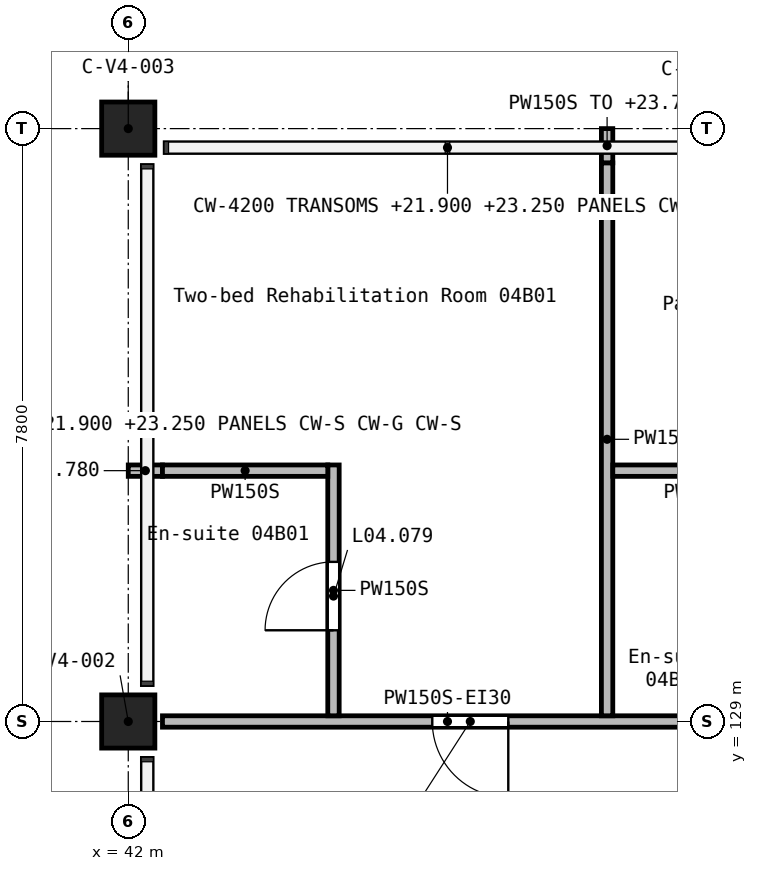
"""IFC4 building model, lengths in metres.
Left out: names, types, materials, properties, quantities, classifications, styles, units other than length and angle.
Written with IfcOpenShell. Run it as: python <this file> out.ifc"""

import sys

from ifc_helpers import new_model, si_unit, direction, frame, frame_2d, origin, origin_2d, place, context, subcontext, project, spatial, rectangle, extrude, element, fill, save


model = new_model("IFC4")
c1 = context("Model", 3, precision=1e-05, world=origin(), true_north=direction((0.0, 1.0)))
c2 = subcontext(c1, "Body", "Model", "MODEL_VIEW")
j1 = project(units=[si_unit("LENGTHUNIT", "METRE"), si_unit("PLANEANGLEUNIT", "RADIAN")], contexts=[c1])
p1 = place(None, origin())
s1 = spatial("IfcSite", under=j1, at=p1, CompositionType="ELEMENT")
p2 = place(p1, origin())
s2 = spatial("IfcBuilding", under=s1, at=p2, CompositionType="ELEMENT")
p3 = place(p2, frame((0.0, 0.0, 21.0)))
s3 = spatial("IfcBuildingStorey", under=s2, at=p3, CompositionType="ELEMENT", Elevation=21.0)
for number, where, z_axis, x_axis in (
    (1, (42.0, 129.0, 0.0), (0.0, 0.0, 1.0), (1.0, 0.0, 0.0)),
    (2, (42.0, 136.8, 0.0), (0.0, 0.0, 1.0), (1.0, 0.0, 0.0)),
):
    element("IfcColumn", number, at=place(p3, frame(where, z_axis=z_axis, x_axis=x_axis)), inside=s3, PredefinedType="COLUMN", context=c2, shape_type="SweptSolid", body=[
        extrude(rectangle(XDim=0.7, YDim=0.7, at=origin_2d()), origin(), (0.0, 0.0, 1.0), 3.9),
    ])
p4 = place(p3, frame((49.95, 129.0, 0.0), z_axis=(0.0, 0.0, 1.0), x_axis=(-1.0, 0.0, 0.0)))
e3 = element("IfcWall", 3, at=p4, inside=s3, PredefinedType="PARTITIONING", context=c2, shape_type="SweptSolid", body=[
    extrude(rectangle(XDim=7.5, YDim=0.15, at=frame_2d((3.75, 0.0))), origin(), (0.0, 0.0, 1.0), 3.6),
])
p5 = place(p4, frame((2.95, 0.0, 0.0)))
e4 = element("IfcOpeningElement", 4, at=p5, cuts=e3, PredefinedType="OPENING", context=c2, shape_type="SweptSolid", body=[
    extrude(rectangle(XDim=1.0, YDim=2.1, at=frame_2d((0.5, 1.05))), frame((0.0, 0.085, 0.0), z_axis=(0.0, -1.0, 0.0), x_axis=(1.0, 0.0, 0.0)), (0.0, 0.0, 1.0), 0.17),
])
p6 = place(p3, frame((48.3, 129.075, 0.0), z_axis=(0.0, 0.0, 1.0), x_axis=(0.0, 1.0, 0.0)))
e5 = element("IfcWall", 5, at=p6, inside=s3, PredefinedType="PARTITIONING", context=c2, shape_type="SweptSolid", body=[
    extrude(rectangle(XDim=7.275, YDim=0.15, at=frame_2d((3.638, 0.0))), origin(), (0.0, 0.0, 1.0), 3.6),
])
p7 = place(p3, frame((48.3, 136.35, 0.0), z_axis=(0.0, 0.0, 1.0), x_axis=(0.0, 1.0, 0.0)))
e6 = element("IfcWall", 6, at=p7, inside=s3, PredefinedType="PARTITIONING", context=c2, shape_type="SweptSolid", body=[
    extrude(rectangle(XDim=0.45, YDim=0.15, at=frame_2d((0.225, 0.0))), origin(), (0.0, 0.0, 1.0), 2.78),
])
p8 = place(p3, frame((44.7, 129.075, 0.0), z_axis=(0.0, 0.0, 1.0), x_axis=(0.0, 1.0, 0.0)))
e7 = element("IfcWall", 7, at=p8, inside=s3, PredefinedType="PARTITIONING", context=c2, shape_type="SweptSolid", body=[
    extrude(rectangle(XDim=3.3, YDim=0.15, at=frame_2d((1.65, 0.0))), origin(), (0.0, 0.0, 1.0), 3.6),
])
p9 = place(p8, frame((1.125, 0.0, 0.0)))
e8 = element("IfcOpeningElement", 8, at=p9, cuts=e7, PredefinedType="OPENING", context=c2, shape_type="SweptSolid", body=[
    extrude(rectangle(XDim=0.9, YDim=2.1, at=frame_2d((0.45, 1.05))), frame((0.0, 0.085, 0.0), z_axis=(0.0, -1.0, 0.0), x_axis=(1.0, 0.0, 0.0)), (0.0, 0.0, 1.0), 0.17),
])
p10 = place(p3, frame((42.0, 132.3, 0.0), z_axis=(0.0, 0.0, 1.0), x_axis=(1.0, 0.0, 0.0)))
e9 = element("IfcWall", 9, at=p10, inside=s3, PredefinedType="PARTITIONING", context=c2, shape_type="SweptSolid", body=[
    extrude(rectangle(XDim=0.45, YDim=0.15, at=frame_2d((0.225, 0.0))), origin(), (0.0, 0.0, 1.0), 2.78),
])
p11 = place(p3, frame((42.45, 132.3, 0.0), z_axis=(0.0, 0.0, 1.0), x_axis=(1.0, 0.0, 0.0)))
e10 = element("IfcWall", 10, at=p11, inside=s3, PredefinedType="PARTITIONING", context=c2, shape_type="SweptSolid", body=[
    extrude(rectangle(XDim=2.175, YDim=0.15, at=frame_2d((1.087, 0.0))), origin(), (0.0, 0.0, 1.0), 3.6),
])
p12 = place(p3, frame((48.375, 132.3, 0.0), z_axis=(0.0, 0.0, 1.0), x_axis=(1.0, 0.0, 0.0)))
e11 = element("IfcWall", 11, at=p12, inside=s3, PredefinedType="PARTITIONING", context=c2, shape_type="SweptSolid", body=[
    extrude(rectangle(XDim=2.25, YDim=0.15, at=frame_2d((1.125, 0.0))), origin(), (0.0, 0.0, 1.0), 3.6),
])
p13 = place(p5, frame((1.0, 0.0, 0.0), z_axis=(0.0, 0.0, 1.0), x_axis=(-1.0, 0.0, 0.0)))
e12 = element("IfcDoor", 12, at=p13, inside=s3, OperationType="SINGLE_SWING_RIGHT", PredefinedType="DOOR", context=c2, shape_type="SweptSolid", body=[
    extrude(rectangle(XDim=1.0, YDim=2.1, at=frame_2d((0.5, 1.05))), frame((0.0, 0.025, 0.0), z_axis=(0.0, -1.0, 0.0), x_axis=(1.0, 0.0, 0.0)), (0.0, 0.0, 1.0), 0.05),
])
fill(e4, e12)
p14 = place(p9, origin())
e13 = element("IfcDoor", 13, at=p14, inside=s3, OperationType="SINGLE_SWING_LEFT", PredefinedType="DOOR", context=c2, shape_type="SweptSolid", body=[
    extrude(rectangle(XDim=0.9, YDim=2.1, at=frame_2d((0.45, 1.05))), frame((0.0, 0.025, 0.0), z_axis=(0.0, -1.0, 0.0), x_axis=(1.0, 0.0, 0.0)), (0.0, 0.0, 1.0), 0.05),
])
fill(e8, e13)
save(model, sys.argv[1])
